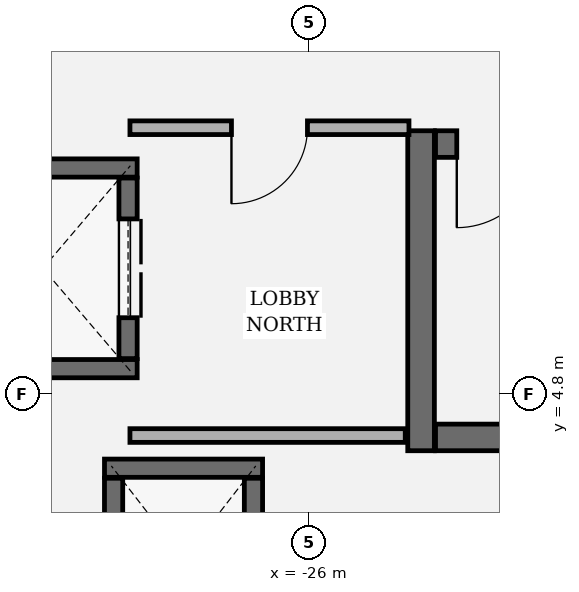
"""IFC4 building model, lengths in metres.
Left out: names, types, materials, properties, quantities, classifications, styles, units other than length and angle.
Written with IfcOpenShell. Run it as: python <this file> out.ifc"""

import sys

from ifc_helpers import new_model, si_unit, direction, frame, frame_2d, origin, place, context, subcontext, project, spatial, rectangle, extrude, element, fill, save


model = new_model("IFC4")
c1 = context("Model", 3, precision=1e-05, world=origin(), true_north=direction((0.0, 1.0)))
c2 = subcontext(c1, "Body", "Model", "MODEL_VIEW")
j1 = project(units=[si_unit("LENGTHUNIT", "METRE"), si_unit("PLANEANGLEUNIT", "RADIAN")], contexts=[c1])
p1 = place(None, origin())
s1 = spatial("IfcSite", under=j1, at=p1, CompositionType="ELEMENT")
p2 = place(p1, origin())
s2 = spatial("IfcBuilding", under=s1, at=p2, CompositionType="ELEMENT")
p3 = place(p2, frame((0.0, 0.0, -5.4)))
s3 = spatial("IfcBuildingStorey", under=s2, at=p3, CompositionType="ELEMENT", Elevation=-5.4)
p4 = place(p3, frame((-13.635, 37.094, 0.0), z_axis=(0.0, 0.0, 1.0), x_axis=(-0.842602364841, -0.538536214905, 0.0)))
e1 = element("IfcWall", 1, at=p4, inside=s3, PredefinedType="USERDEFINED", context=c2, shape_type="SweptSolid", body=[
    extrude(rectangle(XDim=60.27, YDim=0.55, at=frame_2d((30.135, 0.0))), origin(), (0.0, 0.0, 1.0), 4.3),
])
p5 = place(p3, frame((-24.525, 8.26, 0.0), z_axis=(0.0, 0.0, 1.0), x_axis=(0.0, -1.0, 0.0)))
e2 = element("IfcWall", 2, at=p5, inside=s3, PredefinedType="SHEAR", context=c2, shape_type="SweptSolid", body=[
    extrude(rectangle(XDim=4.21, YDim=0.35, at=frame_2d((2.105, 0.0))), origin(), (0.0, 0.0, 1.0), 5.1),
])
p6 = place(p3, frame((-24.335, 4.225, 0.0), z_axis=(0.0, 0.0, 1.0), x_axis=(1.0, 0.0, 0.0)))
e3 = element("IfcWall", 3, at=p6, inside=s3, PredefinedType="SHEAR", context=c2, shape_type="SweptSolid", body=[
    extrude(rectangle(XDim=8.12, YDim=0.35, at=frame_2d((4.06, 0.0))), origin(), (0.0, 0.0, 1.0), 5.1),
])
p7 = place(p3, frame((-16.215, 8.085, 0.0), z_axis=(0.0, 0.0, 1.0), x_axis=(-1.0, 0.0, 0.0)))
e4 = element("IfcWall", 4, at=p7, inside=s3, PredefinedType="SHEAR", context=c2, shape_type="SweptSolid", body=[
    extrude(rectangle(XDim=8.12, YDim=0.35, at=frame_2d((4.06, 0.0))), origin(), (0.0, 0.0, 1.0), 5.1),
])
p8 = place(p7, frame((6.74, 0.0, 0.0)))
e5 = element("IfcOpeningElement", 5, at=p8, cuts=e4, PredefinedType="OPENING", context=c2, shape_type="SweptSolid", body=[
    extrude(rectangle(XDim=1.1, YDim=2.2, at=frame_2d((0.55, 1.1))), frame((0.0, 0.185, 0.0), z_axis=(0.0, -1.0, 0.0), x_axis=(1.0, 0.0, 0.0)), (0.0, 0.0, 1.0), 0.37),
])
for number, where, z_axis, x_axis in (
    (6, (-28.26, 5.13, 0.0), (0.0, 0.0, 1.0), (-1.0, 0.0, 0.0)),
    (7, (-30.74, 7.77, 0.0), (0.0, 0.0, 1.0), (1.0, 0.0, 0.0)),
):
    element("IfcWall", number, at=place(p3, frame(where, z_axis=z_axis, x_axis=x_axis)), inside=s3, PredefinedType="SHEAR", context=c2, shape_type="SweptSolid", body=[
        extrude(rectangle(XDim=2.48, YDim=0.24, at=frame_2d((1.24, 0.0))), origin(), (0.0, 0.0, 1.0), 5.1),
    ])
p9 = place(p3, frame((-28.38, 7.638, 0.0), z_axis=(0.0, 0.0, 1.0), x_axis=(0.0, -1.0, 0.0)))
e8 = element("IfcWall", 8, at=p9, inside=s3, PredefinedType="SHEAR", context=c2, shape_type="SweptSolid", body=[
    extrude(rectangle(XDim=2.376, YDim=0.24, at=frame_2d((1.188, 0.0))), origin(), (0.0, 0.0, 1.0), 5.1),
])
p10 = place(p9, frame((0.538, 0.0, 0.0)))
e9 = element("IfcOpeningElement", 9, at=p10, cuts=e8, PredefinedType="OPENING", context=c2, shape_type="SweptSolid", body=[
    extrude(rectangle(XDim=1.3, YDim=2.3, at=frame_2d((0.65, 1.15))), frame((0.0, 0.13, 0.0), z_axis=(0.0, -1.0, 0.0), x_axis=(1.0, 0.0, 0.0)), (0.0, 0.0, 1.0), 0.26),
])
p11 = place(p3, frame((-28.69, 3.82, 0.0), z_axis=(0.0, 0.0, 1.0), x_axis=(1.0, 0.0, 0.0)))
e10 = element("IfcWall", 10, at=p11, inside=s3, PredefinedType="SHEAR", context=c2, shape_type="SweptSolid", body=[
    extrude(rectangle(XDim=2.08, YDim=0.24, at=frame_2d((1.04, 0.0))), origin(), (0.0, 0.0, 1.0), 5.1),
])
for number, where, z_axis, x_axis in (
    (11, (-28.57, 1.562, 0.0), (0.0, 0.0, 1.0), (0.0, 1.0, 0.0)),
    (12, (-26.73, 3.688, 0.0), (0.0, 0.0, 1.0), (0.0, -1.0, 0.0)),
):
    element("IfcWall", number, at=place(p3, frame(where, z_axis=z_axis, x_axis=x_axis)), inside=s3, PredefinedType="SHEAR", context=c2, shape_type="SweptSolid", body=[
        extrude(rectangle(XDim=2.126, YDim=0.24, at=frame_2d((1.063, 0.0))), origin(), (0.0, 0.0, 1.0), 5.1),
    ])
p12 = place(p3, frame((-28.355, 4.25, 0.0), z_axis=(0.0, 0.0, 1.0), x_axis=(1.0, 0.0, 0.0)))
e13 = element("IfcWall", 13, at=p12, inside=s3, PredefinedType="PARTITIONING", context=c2, shape_type="SweptSolid", body=[
    extrude(rectangle(XDim=3.622, YDim=0.18, at=frame_2d((1.811, 0.0))), origin(), (0.0, 0.0, 1.0), 5.1),
])
p13 = place(p3, frame((-24.684, 8.3, 0.0), z_axis=(0.0, 0.0, 1.0), x_axis=(-1.0, 0.0, 0.0)))
e14 = element("IfcWall", 14, at=p13, inside=s3, PredefinedType="PARTITIONING", context=c2, shape_type="SweptSolid", body=[
    extrude(rectangle(XDim=3.671, YDim=0.18, at=frame_2d((1.835, 0.0))), origin(), (0.0, 0.0, 1.0), 4.613),
])
p14 = place(p13, frame((1.335, 0.0, 0.0)))
e15 = element("IfcOpeningElement", 15, at=p14, cuts=e14, PredefinedType="OPENING", context=c2, shape_type="SweptSolid", body=[
    extrude(rectangle(XDim=1.0, YDim=2.15, at=frame_2d((0.5, 1.075))), frame((0.0, 0.1, 0.0), z_axis=(0.0, -1.0, 0.0), x_axis=(1.0, 0.0, 0.0)), (0.0, 0.0, 1.0), 0.2),
])
p15 = place(p8, origin())
e16 = element("IfcDoor", 16, at=p15, inside=s3, OperationType="SINGLE_SWING_RIGHT", PredefinedType="DOOR", context=c2, shape_type="SweptSolid", body=[
    extrude(rectangle(XDim=1.1, YDim=2.2, at=frame_2d((0.55, 1.1))), frame((0.0, 0.025, 0.0), z_axis=(0.0, -1.0, 0.0), x_axis=(1.0, 0.0, 0.0)), (0.0, 0.0, 1.0), 0.05),
])
fill(e5, e16)
p16 = place(p10, origin())
e17 = element("IfcDoor", 17, at=p16, inside=s3, OperationType="DOUBLE_DOOR_SLIDING", PredefinedType="DOOR", context=c2, shape_type="SweptSolid", body=[
    extrude(rectangle(XDim=1.3, YDim=2.3, at=frame_2d((0.65, 1.15))), frame((0.0, 0.025, 0.0), z_axis=(0.0, -1.0, 0.0), x_axis=(1.0, 0.0, 0.0)), (0.0, 0.0, 1.0), 0.05),
])
fill(e9, e17)
p17 = place(p14, origin())
e18 = element("IfcDoor", 18, at=p17, inside=s3, OperationType="SINGLE_SWING_RIGHT", PredefinedType="DOOR", context=c2, shape_type="SweptSolid", body=[
    extrude(rectangle(XDim=1.0, YDim=2.15, at=frame_2d((0.5, 1.075))), frame((0.0, 0.025, 0.0), z_axis=(0.0, -1.0, 0.0), x_axis=(1.0, 0.0, 0.0)), (0.0, 0.0, 1.0), 0.05),
])
fill(e15, e18)
save(model, sys.argv[1])
